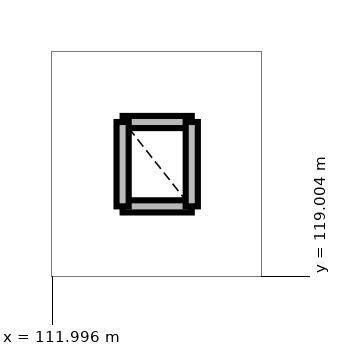
"""IFC4 building model, lengths in metres.
Left out: names, types, materials, properties, quantities, classifications, styles, units other than length and angle.
Written with IfcOpenShell. Run it as: python <this file> out.ifc"""

import sys

from ifc_helpers import new_model, si_unit, direction, frame, frame_2d, origin, place, context, subcontext, project, spatial, rectangle, extrude, element, save


model = new_model("IFC4")
c1 = context("Model", 3, precision=1e-05, world=origin(), true_north=direction((0.0, 1.0)))
c2 = subcontext(c1, "Body", "Model", "MODEL_VIEW")
j1 = project(units=[si_unit("LENGTHUNIT", "METRE"), si_unit("PLANEANGLEUNIT", "RADIAN")], contexts=[c1])
p1 = place(None, origin())
s1 = spatial("IfcSite", under=j1, at=p1, CompositionType="ELEMENT")
p2 = place(p1, origin())
s2 = spatial("IfcBuilding", under=s1, at=p2, CompositionType="ELEMENT")
p3 = place(p2, frame((0.0, 0.0, 17.7)))
s3 = spatial("IfcBuildingStorey", under=s2, at=p3, CompositionType="ELEMENT", Elevation=17.7)
for number, where, z_axis, x_axis in (
    (1, (112.92, 119.92, 0.0), (0.0, 0.0, 1.0), (1.0, 0.0, 0.0)),
    (2, (113.83, 121.03, 0.0), (0.0, 0.0, 1.0), (-1.0, 0.0, 0.0)),
):
    element("IfcWall", number, at=place(p3, frame(where, z_axis=z_axis, x_axis=x_axis)), inside=s3, PredefinedType="PARTITIONING", context=c2, shape_type="SweptSolid", body=[
        extrude(rectangle(XDim=0.91, YDim=0.16, at=frame_2d((0.455, 0.0))), origin(), (0.0, 0.0, 1.0), 3.485),
    ])
for number, where, z_axis, x_axis in (
    (3, (112.92, 121.03, 0.0), (0.0, 0.0, 1.0), (0.0, -1.0, 0.0)),
    (4, (113.83, 119.92, 0.0), (0.0, 0.0, 1.0), (0.0, 1.0, 0.0)),
):
    element("IfcWall", number, at=place(p3, frame(where, z_axis=z_axis, x_axis=x_axis)), inside=s3, PredefinedType="PARTITIONING", context=c2, shape_type="SweptSolid", body=[
        extrude(rectangle(XDim=1.11, YDim=0.16, at=frame_2d((0.555, 0.0))), origin(), (0.0, 0.0, 1.0), 3.65),
    ])
save(model, sys.argv[1])
